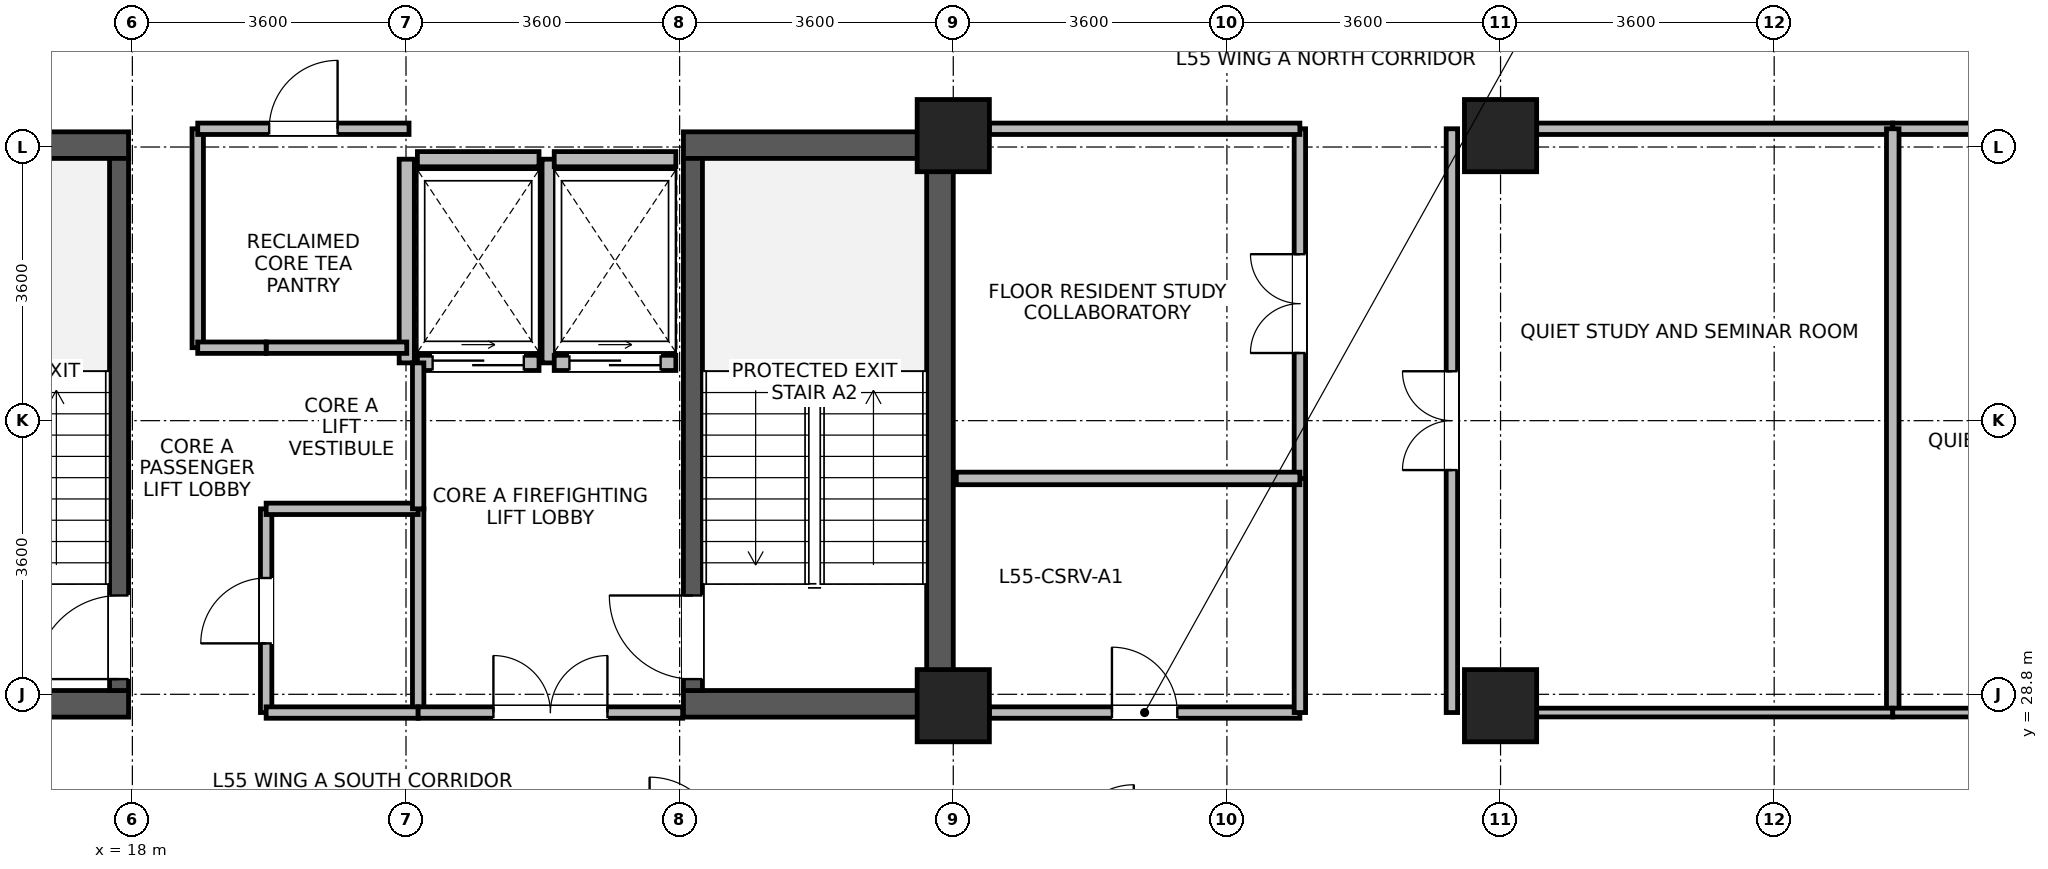
"""IFC4 building model, lengths in metres.
Left out: names, types, materials, properties, quantities, classifications, styles, units other than length and angle.
Written with IfcOpenShell. Run it as: python <this file> out.ifc"""

import sys

from ifc_helpers import new_model, si_unit, direction, frame, frame_2d, origin, origin_2d, place, context, subcontext, project, spatial, rectangle, extrude, source, transform, mapped, element, fill, save


model = new_model("IFC4")
c1 = context("Model", 3, precision=1e-05, world=origin(), true_north=direction((0.0, 1.0)))
c2 = subcontext(c1, "Body", "Model", "MODEL_VIEW")
j1 = project(units=[si_unit("LENGTHUNIT", "METRE"), si_unit("PLANEANGLEUNIT", "RADIAN")], contexts=[c1])
p1 = place(None, origin())
s1 = spatial("IfcSite", under=j1, at=p1, CompositionType="ELEMENT")
p2 = place(p1, origin())
s2 = spatial("IfcBuilding", under=s1, at=p2, CompositionType="ELEMENT")
p3 = place(p2, frame((0.0, 0.0, 216.6)))
s3 = spatial("IfcBuildingStorey", under=s2, at=p3, CompositionType="ELEMENT", Elevation=216.6)
p4 = place(p3, frame((28.625, 28.5, 0.0), z_axis=(0.0, 0.0, 1.0), x_axis=(0.0, 1.0, 0.0)))
e1 = element("IfcWall", 1, at=p4, inside=s3, PredefinedType="SHEAR", context=c2, shape_type="SweptSolid", body=[
    extrude(rectangle(XDim=7.7, YDim=0.35, at=frame_2d((3.85, 0.0))), origin(), (0.0, 0.0, 1.0), 3.47),
])
for number, where, z_axis, x_axis in (
    (2, (14.75, 28.675, 0.0), (0.0, 0.0, 1.0), (1.0, 0.0, 0.0)),
    (3, (25.25, 28.675, 0.0), (0.0, 0.0, 1.0), (1.0, 0.0, 0.0)),
    (4, (14.75, 36.025, 0.0), (0.0, 0.0, 1.0), (1.0, 0.0, 0.0)),
    (5, (25.25, 36.025, 0.0), (0.0, 0.0, 1.0), (1.0, 0.0, 0.0)),
):
    element("IfcWall", number, at=place(p3, frame(where, z_axis=z_axis, x_axis=x_axis)), inside=s3, PredefinedType="SHEAR", context=c2, shape_type="SweptSolid", body=[
        extrude(rectangle(XDim=3.2, YDim=0.35, at=frame_2d((1.6, 0.0))), origin(), (0.0, 0.0, 1.0), 3.47),
    ])
p5 = place(p3, frame((17.825, 28.85, 0.0), z_axis=(0.0, 0.0, 1.0), x_axis=(0.0, 1.0, 0.0)))
e6 = element("IfcWall", 6, at=p5, inside=s3, PredefinedType="SHEAR", context=c2, shape_type="SweptSolid", body=[
    extrude(rectangle(XDim=7.0, YDim=0.25, at=frame_2d((3.5, 0.0))), origin(), (0.0, 0.0, 1.0), 3.47),
])
p6 = place(p5, frame((0.15, 0.0, 0.0)))
e7 = element("IfcOpeningElement", 7, at=p6, cuts=e6, PredefinedType="OPENING", context=c2, shape_type="SweptSolid", body=[
    extrude(rectangle(XDim=1.1, YDim=2.08, at=frame_2d((0.55, 1.04))), frame((0.0, 0.135, 0.0), z_axis=(0.0, -1.0, 0.0), x_axis=(1.0, 0.0, 0.0)), (0.0, 0.0, 1.0), 0.27),
])
p7 = place(p3, frame((25.375, 28.85, 0.0), z_axis=(0.0, 0.0, 1.0), x_axis=(0.0, 1.0, 0.0)))
e8 = element("IfcWall", 8, at=p7, inside=s3, PredefinedType="SHEAR", context=c2, shape_type="SweptSolid", body=[
    extrude(rectangle(XDim=7.0, YDim=0.25, at=frame_2d((3.5, 0.0))), origin(), (0.0, 0.0, 1.0), 3.47),
])
p8 = place(p7, frame((0.15, 0.0, 0.0)))
e9 = element("IfcOpeningElement", 9, at=p8, cuts=e8, PredefinedType="OPENING", context=c2, shape_type="SweptSolid", body=[
    extrude(rectangle(XDim=1.1, YDim=2.08, at=frame_2d((0.55, 1.04))), frame((0.0, 0.135, 0.0), z_axis=(0.0, -1.0, 0.0), x_axis=(1.0, 0.0, 0.0)), (0.0, 0.0, 1.0), 0.27),
])
m1 = source(origin(), c2, "Body", "SweptSolid", [
    extrude(rectangle(XDim=0.95, YDim=0.95, at=origin_2d()), origin(), (0.0, 0.0, 1.0), 3.7),
])
for number, where, z_axis, x_axis in (
    (10, (28.8, 28.65, 0.0), (0.0, 0.0, 1.0), (1.0, 0.0, 0.0)),
    (11, (28.8, 36.15, 0.0), (0.0, 0.0, 1.0), (1.0, 0.0, 0.0)),
    (12, (36.0, 28.65, 0.0), (0.0, 0.0, 1.0), (1.0, 0.0, 0.0)),
    (13, (36.0, 36.15, 0.0), (0.0, 0.0, 1.0), (1.0, 0.0, 0.0)),
):
    element("IfcColumn", number, at=place(p3, frame(where, z_axis=z_axis, x_axis=x_axis)), inside=s3, PredefinedType="COLUMN", context=c2, shape_type="MappedRepresentation", body=[
        mapped(m1, transform((0.0, 0.0, 0.0), x_axis=(1.0, 0.0, 0.0), y_axis=(0.0, 1.0, 0.0), z_axis=(0.0, 0.0, 1.0), scale=1.0)),
    ])
p9 = place(p3, frame((21.75, 33.16, 0.0), z_axis=(0.0, 0.0, 1.0), x_axis=(1.0, 0.0, 0.0)))
e14 = element("IfcWall", 14, at=p9, inside=s3, PredefinedType="PARTITIONING", context=c2, shape_type="SweptSolid", body=[
    extrude(rectangle(XDim=1.6, YDim=0.2, at=frame_2d((0.8, 0.0))), origin(), (0.0, 0.0, 1.0), 3.45),
])
p10 = place(p9, frame((0.2, 0.0, 0.0)))
e15 = element("IfcOpeningElement", 15, at=p10, cuts=e14, PredefinedType="OPENING", context=c2, shape_type="SweptSolid", body=[
    extrude(rectangle(XDim=1.2, YDim=2.12, at=frame_2d((0.6, 1.06))), frame((0.0, 0.11, 0.0), z_axis=(0.0, -1.0, 0.0), x_axis=(1.0, 0.0, 0.0)), (0.0, 0.0, 1.0), 0.22),
])
p11 = place(p3, frame((21.75, 35.84, 0.0), z_axis=(0.0, 0.0, 1.0), x_axis=(1.0, 0.0, 0.0)))
e16 = element("IfcWall", 16, at=p11, inside=s3, PredefinedType="PARTITIONING", context=c2, shape_type="SweptSolid", body=[
    extrude(rectangle(XDim=1.6, YDim=0.2, at=frame_2d((0.8, 0.0))), origin(), (0.0, 0.0, 1.0), 2.55),
])
for number, where, z_axis, x_axis in (
    (17, (21.61, 33.16, 0.0), (0.0, 0.0, 1.0), (0.0, 1.0, 0.0)),
    (18, (23.49, 33.16, 0.0), (0.0, 0.0, 1.0), (0.0, 1.0, 0.0)),
):
    element("IfcWall", number, at=place(p3, frame(where, z_axis=z_axis, x_axis=x_axis)), inside=s3, PredefinedType="PARTITIONING", context=c2, shape_type="SweptSolid", body=[
        extrude(rectangle(XDim=2.68, YDim=0.2, at=frame_2d((1.34, 0.0))), origin(), (0.0, 0.0, 1.0), 3.45),
    ])
p12 = place(p3, frame((23.55, 33.16, 0.0), z_axis=(0.0, 0.0, 1.0), x_axis=(1.0, 0.0, 0.0)))
e19 = element("IfcWall", 19, at=p12, inside=s3, PredefinedType="PARTITIONING", context=c2, shape_type="SweptSolid", body=[
    extrude(rectangle(XDim=1.6, YDim=0.2, at=frame_2d((0.8, 0.0))), origin(), (0.0, 0.0, 1.0), 3.45),
])
p13 = place(p12, frame((0.2, 0.0, 0.0)))
e20 = element("IfcOpeningElement", 20, at=p13, cuts=e19, PredefinedType="OPENING", context=c2, shape_type="SweptSolid", body=[
    extrude(rectangle(XDim=1.2, YDim=2.12, at=frame_2d((0.6, 1.06))), frame((0.0, 0.11, 0.0), z_axis=(0.0, -1.0, 0.0), x_axis=(1.0, 0.0, 0.0)), (0.0, 0.0, 1.0), 0.22),
])
p14 = place(p3, frame((23.55, 35.84, 0.0), z_axis=(0.0, 0.0, 1.0), x_axis=(1.0, 0.0, 0.0)))
e21 = element("IfcWall", 21, at=p14, inside=s3, PredefinedType="PARTITIONING", context=c2, shape_type="SweptSolid", body=[
    extrude(rectangle(XDim=1.6, YDim=0.2, at=frame_2d((0.8, 0.0))), origin(), (0.0, 0.0, 1.0), 2.55),
])
p15 = place(p3, frame((35.36, 28.56, 0.0), z_axis=(0.0, 0.0, 1.0), x_axis=(0.0, 1.0, 0.0)))
e22 = element("IfcWall", 22, at=p15, inside=s3, PredefinedType="PARTITIONING", context=c2, shape_type="SweptSolid", body=[
    extrude(rectangle(XDim=7.68, YDim=0.15, at=frame_2d((3.84, 0.0))), origin(), (0.0, 0.0, 1.0), 3.45),
])
p16 = place(p15, frame((3.19, 0.0, 0.0)))
e23 = element("IfcOpeningElement", 23, at=p16, cuts=e22, PredefinedType="OPENING", context=c2, shape_type="SweptSolid", body=[
    extrude(rectangle(XDim=1.3, YDim=2.12, at=frame_2d((0.65, 1.06))), frame((0.0, 0.085, 0.0), z_axis=(0.0, -1.0, 0.0), x_axis=(1.0, 0.0, 0.0)), (0.0, 0.0, 1.0), 0.17),
])
p17 = place(p3, frame((36.475, 36.24, 0.0), z_axis=(0.0, 0.0, 1.0), x_axis=(1.0, 0.0, 0.0)))
e24 = element("IfcWall", 24, at=p17, inside=s3, PredefinedType="PARTITIONING", context=c2, shape_type="SweptSolid", body=[
    extrude(rectangle(XDim=4.685, YDim=0.15, at=frame_2d((2.342, 0.0))), origin(), (0.0, 0.0, 1.0), 2.9),
])
p18 = place(p3, frame((41.16, 36.24, 0.0), z_axis=(0.0, 0.0, 1.0), x_axis=(1.0, 0.0, 0.0)))
e25 = element("IfcWall", 25, at=p18, inside=s3, PredefinedType="PARTITIONING", context=c2, shape_type="SweptSolid", body=[
    extrude(rectangle(XDim=5.165, YDim=0.15, at=frame_2d((2.583, 0.0))), origin(), (0.0, 0.0, 1.0), 2.9),
])
p19 = place(p18, frame((1.933, 0.0, 0.0)))
e26 = element("IfcOpeningElement", 26, at=p19, cuts=e25, PredefinedType="OPENING", context=c2, shape_type="SweptSolid", body=[
    extrude(rectangle(XDim=1.3, YDim=2.12, at=frame_2d((0.65, 1.06))), frame((0.0, 0.085, 0.0), z_axis=(0.0, -1.0, 0.0), x_axis=(1.0, 0.0, 0.0)), (0.0, 0.0, 1.0), 0.17),
])
p20 = place(p3, frame((33.36, 31.64, 0.0), z_axis=(0.0, 0.0, 1.0), x_axis=(0.0, 1.0, 0.0)))
e27 = element("IfcWall", 27, at=p20, inside=s3, PredefinedType="PARTITIONING", context=c2, shape_type="SweptSolid", body=[
    extrude(rectangle(XDim=4.6, YDim=0.15, at=frame_2d((2.3, 0.0))), origin(), (0.0, 0.0, 1.0), 3.45),
])
p21 = place(p20, frame((1.65, 0.0, 0.0)))
e28 = element("IfcOpeningElement", 28, at=p21, cuts=e27, PredefinedType="OPENING", context=c2, shape_type="SweptSolid", body=[
    extrude(rectangle(XDim=1.3, YDim=2.12, at=frame_2d((0.65, 1.06))), frame((0.0, 0.085, 0.0), z_axis=(0.0, -1.0, 0.0), x_axis=(1.0, 0.0, 0.0)), (0.0, 0.0, 1.0), 0.17),
])
p22 = place(p3, frame((29.275, 28.56, 0.0), z_axis=(0.0, 0.0, 1.0), x_axis=(1.0, 0.0, 0.0)))
e29 = element("IfcWall", 29, at=p22, inside=s3, PredefinedType="PARTITIONING", context=c2, shape_type="SweptSolid", body=[
    extrude(rectangle(XDim=4.085, YDim=0.15, at=frame_2d((2.042, 0.0))), origin(), (0.0, 0.0, 1.0), 2.9),
])
p23 = place(p22, frame((1.613, 0.0, 0.0)))
e30 = element("IfcOpeningElement", 30, at=p23, cuts=e29, PredefinedType="OPENING", context=c2, shape_type="SweptSolid", body=[
    extrude(rectangle(XDim=0.86, YDim=2.02, at=frame_2d((0.43, 1.01))), frame((0.0, 0.085, 0.0), z_axis=(0.0, -1.0, 0.0), x_axis=(1.0, 0.0, 0.0)), (0.0, 0.0, 1.0), 0.17),
])
p24 = place(p3, frame((29.275, 36.24, 0.0), z_axis=(0.0, 0.0, 1.0), x_axis=(1.0, 0.0, 0.0)))
e31 = element("IfcWall", 31, at=p24, inside=s3, PredefinedType="PARTITIONING", context=c2, shape_type="SweptSolid", body=[
    extrude(rectangle(XDim=4.085, YDim=0.15, at=frame_2d((2.042, 0.0))), origin(), (0.0, 0.0, 1.0), 2.9),
])
p25 = place(p3, frame((33.36, 28.56, 0.0), z_axis=(0.0, 0.0, 1.0), x_axis=(0.0, 1.0, 0.0)))
e32 = element("IfcWall", 32, at=p25, inside=s3, PredefinedType="PARTITIONING", context=c2, shape_type="SweptSolid", body=[
    extrude(rectangle(XDim=3.08, YDim=0.15, at=frame_2d((1.54, 0.0))), origin(), (0.0, 0.0, 1.0), 3.45),
])
p26 = place(p3, frame((18.86, 33.36, 0.0), z_axis=(0.0, 0.0, 1.0), x_axis=(0.0, 1.0, 0.0)))
e33 = element("IfcWall", 33, at=p26, inside=s3, PredefinedType="PARTITIONING", context=c2, shape_type="SweptSolid", body=[
    extrude(rectangle(XDim=2.88, YDim=0.15, at=frame_2d((1.44, 0.0))), origin(), (0.0, 0.0, 1.0), 3.45),
])
p27 = place(p3, frame((18.86, 36.24, 0.0), z_axis=(0.0, 0.0, 1.0), x_axis=(1.0, 0.0, 0.0)))
e34 = element("IfcWall", 34, at=p27, inside=s3, PredefinedType="PARTITIONING", context=c2, shape_type="SweptSolid", body=[
    extrude(rectangle(XDim=2.78, YDim=0.15, at=frame_2d((1.39, 0.0))), origin(), (0.0, 0.0, 1.0), 2.55),
])
p28 = place(p27, frame((0.94, 0.0, 0.0)))
e35 = element("IfcOpeningElement", 35, at=p28, cuts=e34, PredefinedType="OPENING", context=c2, shape_type="SweptSolid", body=[
    extrude(rectangle(XDim=0.9, YDim=2.08, at=frame_2d((0.45, 1.04))), frame((0.0, 0.085, 0.0), z_axis=(0.0, -1.0, 0.0), x_axis=(1.0, 0.0, 0.0)), (0.0, 0.0, 1.0), 0.17),
])
p29 = place(p3, frame((19.76, 28.56, 0.0), z_axis=(0.0, 0.0, 1.0), x_axis=(0.0, 1.0, 0.0)))
e36 = element("IfcWall", 36, at=p29, inside=s3, PredefinedType="PARTITIONING", context=c2, shape_type="SweptSolid", body=[
    extrude(rectangle(XDim=2.68, YDim=0.15, at=frame_2d((1.34, 0.0))), origin(), (0.0, 0.0, 1.0), 3.45),
])
p30 = place(p29, frame((0.91, 0.0, 0.0)))
e37 = element("IfcOpeningElement", 37, at=p30, cuts=e36, PredefinedType="OPENING", context=c2, shape_type="SweptSolid", body=[
    extrude(rectangle(XDim=0.86, YDim=2.02, at=frame_2d((0.43, 1.01))), frame((0.0, 0.085, 0.0), z_axis=(0.0, -1.0, 0.0), x_axis=(1.0, 0.0, 0.0)), (0.0, 0.0, 1.0), 0.17),
])
p31 = place(p3, frame((21.76, 28.56, 0.0), z_axis=(0.0, 0.0, 1.0), x_axis=(0.0, 1.0, 0.0)))
e38 = element("IfcWall", 38, at=p31, inside=s3, PredefinedType="PARTITIONING", context=c2, shape_type="SweptSolid", body=[
    extrude(rectangle(XDim=2.68, YDim=0.15, at=frame_2d((1.34, 0.0))), origin(), (0.0, 0.0, 1.0), 3.45),
])
p32 = place(p3, frame((19.76, 28.56, 0.0), z_axis=(0.0, 0.0, 1.0), x_axis=(1.0, 0.0, 0.0)))
e39 = element("IfcWall", 39, at=p32, inside=s3, PredefinedType="PARTITIONING", context=c2, shape_type="SweptSolid", body=[
    extrude(rectangle(XDim=2.0, YDim=0.15, at=frame_2d((1.0, 0.0))), origin(), (0.0, 0.0, 1.0), 2.55),
])
p33 = place(p3, frame((19.76, 31.24, 0.0), z_axis=(0.0, 0.0, 1.0), x_axis=(1.0, 0.0, 0.0)))
e40 = element("IfcWall", 40, at=p33, inside=s3, PredefinedType="PARTITIONING", context=c2, shape_type="SweptSolid", body=[
    extrude(rectangle(XDim=2.0, YDim=0.15, at=frame_2d((1.0, 0.0))), origin(), (0.0, 0.0, 1.0), 3.45),
])
p34 = place(p3, frame((19.76, 33.36, 0.0), z_axis=(0.0, 0.0, 1.0), x_axis=(1.0, 0.0, 0.0)))
e41 = element("IfcWall", 41, at=p34, inside=s3, PredefinedType="PARTITIONING", context=c2, shape_type="SweptSolid", body=[
    extrude(rectangle(XDim=1.85, YDim=0.15, at=frame_2d((0.925, 0.0))), origin(), (0.0, 0.0, 1.0), 3.45),
])
p35 = place(p3, frame((18.86, 33.36, 0.0), z_axis=(0.0, 0.0, 1.0), x_axis=(1.0, 0.0, 0.0)))
e42 = element("IfcWall", 42, at=p35, inside=s3, PredefinedType="PARTITIONING", context=c2, shape_type="SweptSolid", body=[
    extrude(rectangle(XDim=0.9, YDim=0.15, at=frame_2d((0.45, 0.0))), origin(), (0.0, 0.0, 1.0), 3.45),
])
p36 = place(p3, frame((41.16, 28.56, 0.0), z_axis=(0.0, 0.0, 1.0), x_axis=(0.0, 1.0, 0.0)))
e43 = element("IfcWall", 43, at=p36, inside=s3, PredefinedType="PARTITIONING", context=c2, shape_type="SweptSolid", body=[
    extrude(rectangle(XDim=7.68, YDim=0.165, at=frame_2d((3.84, 0.0))), origin(), (0.0, 0.0, 1.0), 3.45),
])
p37 = place(p3, frame((36.475, 28.56, 0.0), z_axis=(0.0, 0.0, 1.0), x_axis=(1.0, 0.0, 0.0)))
e44 = element("IfcWall", 44, at=p37, inside=s3, PredefinedType="PARTITIONING", context=c2, shape_type="SweptSolid", body=[
    extrude(rectangle(XDim=4.685, YDim=0.115, at=frame_2d((2.342, 0.0))), origin(), (0.0, 0.0, 1.0), 2.9),
])
p38 = place(p3, frame((41.16, 28.56, 0.0), z_axis=(0.0, 0.0, 1.0), x_axis=(1.0, 0.0, 0.0)))
e45 = element("IfcWall", 45, at=p38, inside=s3, PredefinedType="PARTITIONING", context=c2, shape_type="SweptSolid", body=[
    extrude(rectangle(XDim=5.165, YDim=0.115, at=frame_2d((2.583, 0.0))), origin(), (0.0, 0.0, 1.0), 2.9),
])
p39 = place(p3, frame((28.84, 31.64, 0.0), z_axis=(0.0, 0.0, 1.0), x_axis=(1.0, 0.0, 0.0)))
e46 = element("IfcWall", 46, at=p39, inside=s3, PredefinedType="PARTITIONING", context=c2, shape_type="SweptSolid", body=[
    extrude(rectangle(XDim=4.52, YDim=0.165, at=frame_2d((2.26, 0.0))), origin(), (0.0, 0.0, 1.0), 3.45),
])
p40 = place(p3, frame((21.76, 28.56, 0.0), z_axis=(0.0, 0.0, 1.0), x_axis=(1.0, 0.0, 0.0)))
e47 = element("IfcWall", 47, at=p40, inside=s3, PredefinedType="PARTITIONING", context=c2, shape_type="SweptSolid", body=[
    extrude(rectangle(XDim=3.48, YDim=0.15, at=frame_2d((1.74, 0.0))), origin(), (0.0, 0.0, 1.0), 2.55),
])
p41 = place(p40, frame((0.99, 0.0, 0.0)))
e48 = element("IfcOpeningElement", 48, at=p41, cuts=e47, PredefinedType="OPENING", context=c2, shape_type="SweptSolid", body=[
    extrude(rectangle(XDim=1.5, YDim=2.1, at=frame_2d((0.75, 1.05))), frame((0.0, 0.085, 0.0), z_axis=(0.0, -1.0, 0.0), x_axis=(1.0, 0.0, 0.0)), (0.0, 0.0, 1.0), 0.17),
])
p42 = place(p3, frame((21.76, 31.24, 0.0), z_axis=(0.0, 0.0, 1.0), x_axis=(0.0, 1.0, 0.0)))
e49 = element("IfcWall", 49, at=p42, inside=s3, PredefinedType="PARTITIONING", context=c2, shape_type="SweptSolid", body=[
    extrude(rectangle(XDim=1.92, YDim=0.15, at=frame_2d((0.96, 0.0))), origin(), (0.0, 0.0, 1.0), 3.45),
])
p43 = place(p6, origin())
e50 = element("IfcDoor", 50, at=p43, inside=s3, OperationType="SINGLE_SWING_LEFT", PredefinedType="DOOR", context=c2, shape_type="SweptSolid", body=[
    extrude(rectangle(XDim=1.1, YDim=2.08, at=frame_2d((0.55, 1.04))), frame((0.0, 0.025, 0.0), z_axis=(0.0, -1.0, 0.0), x_axis=(1.0, 0.0, 0.0)), (0.0, 0.0, 1.0), 0.05),
])
fill(e7, e50)
p44 = place(p8, origin())
e51 = element("IfcDoor", 51, at=p44, inside=s3, OperationType="SINGLE_SWING_RIGHT", PredefinedType="DOOR", context=c2, shape_type="SweptSolid", body=[
    extrude(rectangle(XDim=1.1, YDim=2.08, at=frame_2d((0.55, 1.04))), frame((0.0, 0.025, 0.0), z_axis=(0.0, -1.0, 0.0), x_axis=(1.0, 0.0, 0.0)), (0.0, 0.0, 1.0), 0.05),
])
fill(e9, e51)
p45 = place(p10, origin())
e52 = element("IfcDoor", 52, at=p45, inside=s3, OperationType="SLIDING_TO_RIGHT", PredefinedType="DOOR", context=c2, shape_type="SweptSolid", body=[
    extrude(rectangle(XDim=1.2, YDim=2.12, at=frame_2d((0.6, 1.06))), frame((0.0, 0.025, 0.0), z_axis=(0.0, -1.0, 0.0), x_axis=(1.0, 0.0, 0.0)), (0.0, 0.0, 1.0), 0.05),
])
fill(e15, e52)
p46 = place(p13, origin())
e53 = element("IfcDoor", 53, at=p46, inside=s3, OperationType="SLIDING_TO_RIGHT", PredefinedType="DOOR", context=c2, shape_type="SweptSolid", body=[
    extrude(rectangle(XDim=1.2, YDim=2.12, at=frame_2d((0.6, 1.06))), frame((0.0, 0.025, 0.0), z_axis=(0.0, -1.0, 0.0), x_axis=(1.0, 0.0, 0.0)), (0.0, 0.0, 1.0), 0.05),
])
fill(e20, e53)
p47 = place(p16, origin())
e54 = element("IfcDoor", 54, at=p47, inside=s3, OperationType="DOUBLE_DOOR_SINGLE_SWING", PredefinedType="DOOR", context=c2, shape_type="SweptSolid", body=[
    extrude(rectangle(XDim=1.3, YDim=2.12, at=frame_2d((0.65, 1.06))), frame((0.0, 0.025, 0.0), z_axis=(0.0, -1.0, 0.0), x_axis=(1.0, 0.0, 0.0)), (0.0, 0.0, 1.0), 0.05),
])
fill(e23, e54)
p48 = place(p21, origin())
e55 = element("IfcDoor", 55, at=p48, inside=s3, OperationType="DOUBLE_DOOR_SINGLE_SWING", PredefinedType="DOOR", context=c2, shape_type="SweptSolid", body=[
    extrude(rectangle(XDim=1.3, YDim=2.12, at=frame_2d((0.65, 1.06))), frame((0.0, 0.025, 0.0), z_axis=(0.0, -1.0, 0.0), x_axis=(1.0, 0.0, 0.0)), (0.0, 0.0, 1.0), 0.05),
])
fill(e28, e55)
p49 = place(p23, origin())
e56 = element("IfcDoor", 56, at=p49, inside=s3, OperationType="SINGLE_SWING_LEFT", PredefinedType="DOOR", context=c2, shape_type="SweptSolid", body=[
    extrude(rectangle(XDim=0.86, YDim=2.02, at=frame_2d((0.43, 1.01))), frame((0.0, 0.025, 0.0), z_axis=(0.0, -1.0, 0.0), x_axis=(1.0, 0.0, 0.0)), (0.0, 0.0, 1.0), 0.05),
])
fill(e30, e56)
p50 = place(p28, origin())
e57 = element("IfcDoor", 57, at=p50, inside=s3, OperationType="SINGLE_SWING_RIGHT", PredefinedType="DOOR", context=c2, shape_type="SweptSolid", body=[
    extrude(rectangle(XDim=0.9, YDim=2.08, at=frame_2d((0.45, 1.04))), frame((0.0, 0.025, 0.0), z_axis=(0.0, -1.0, 0.0), x_axis=(1.0, 0.0, 0.0)), (0.0, 0.0, 1.0), 0.05),
])
fill(e35, e57)
p51 = place(p30, origin())
e58 = element("IfcDoor", 58, at=p51, inside=s3, OperationType="SINGLE_SWING_LEFT", PredefinedType="DOOR", context=c2, shape_type="SweptSolid", body=[
    extrude(rectangle(XDim=0.86, YDim=2.02, at=frame_2d((0.43, 1.01))), frame((0.0, 0.025, 0.0), z_axis=(0.0, -1.0, 0.0), x_axis=(1.0, 0.0, 0.0)), (0.0, 0.0, 1.0), 0.05),
])
fill(e37, e58)
p52 = place(p41, origin())
e59 = element("IfcDoor", 59, at=p52, inside=s3, OperationType="DOUBLE_DOOR_SINGLE_SWING", PredefinedType="DOOR", context=c2, shape_type="SweptSolid", body=[
    extrude(rectangle(XDim=1.5, YDim=2.1, at=frame_2d((0.75, 1.05))), frame((0.0, 0.025, 0.0), z_axis=(0.0, -1.0, 0.0), x_axis=(1.0, 0.0, 0.0)), (0.0, 0.0, 1.0), 0.05),
])
fill(e48, e59)
save(model, sys.argv[1])
